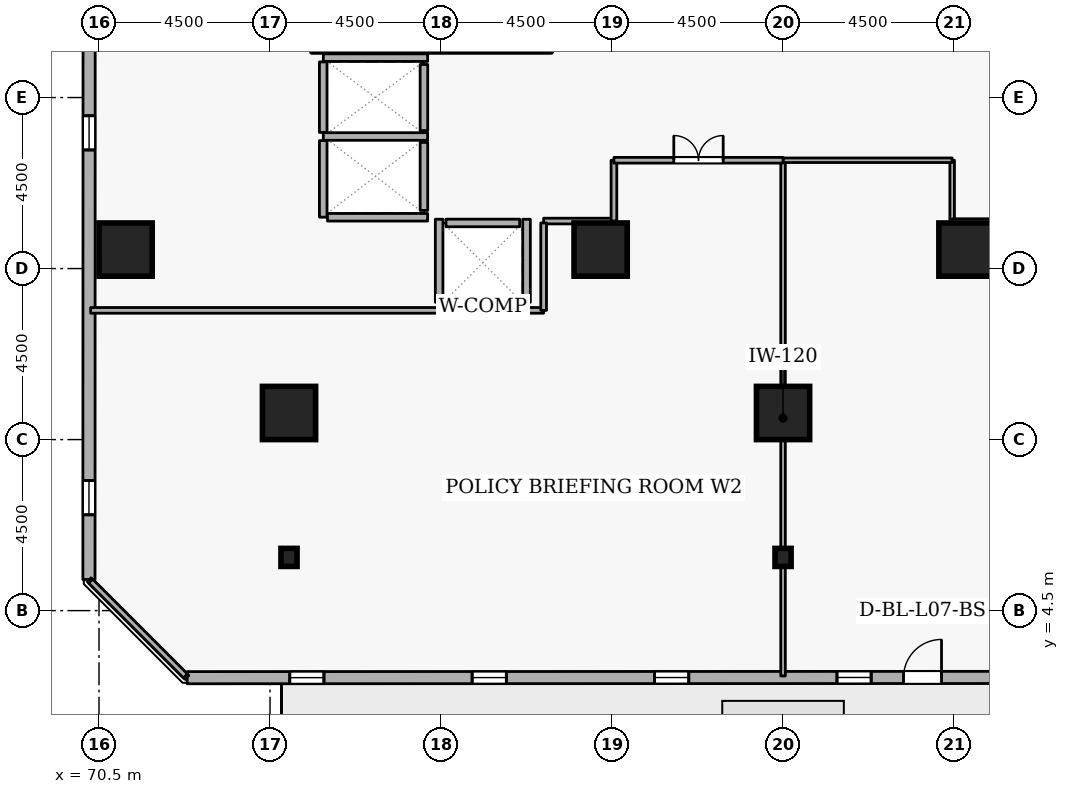
"""IFC4 building model, lengths in metres.
Left out: names, types, materials, properties, quantities, classifications, styles, units other than length and angle.
Written with IfcOpenShell. Run it as: python <this file> out.ifc"""

import sys

from ifc_helpers import new_model, si_unit, direction, frame, frame_2d, origin, origin_2d, place, context, subcontext, project, spatial, rectangle, i_section, extrude, element, fill, save


model = new_model("IFC4")
c1 = context("Model", 3, precision=1e-05, world=origin(), true_north=direction((0.0, 1.0)))
c2 = subcontext(c1, "Body", "Model", "MODEL_VIEW")
j1 = project(units=[si_unit("LENGTHUNIT", "METRE"), si_unit("PLANEANGLEUNIT", "RADIAN")], contexts=[c1])
p1 = place(None, origin())
s1 = spatial("IfcSite", under=j1, at=p1, CompositionType="ELEMENT")
p2 = place(p1, origin())
s2 = spatial("IfcBuilding", under=s1, at=p2, CompositionType="ELEMENT")
p3 = place(p2, frame((0.0, 0.0, 31.5)))
s3 = spatial("IfcBuildingStorey", under=s2, at=p3, CompositionType="ELEMENT", Elevation=31.5)
for number, where, z_axis, x_axis in (
    (1, (71.2, 14.0, 0.0), (0.0, 0.0, 1.0), (1.0, 0.0, 0.0)),
    (2, (88.5, 9.7, 0.0), (0.0, 0.0, 1.0), (1.0, 0.0, 0.0)),
    (3, (75.5, 9.7, 0.0), (0.0, 0.0, 1.0), (1.0, 0.0, 0.0)),
    (4, (93.3, 14.0, 0.0), (0.0, 0.0, 1.0), (1.0, 0.0, 0.0)),
    (5, (83.7, 14.0, 0.0), (0.0, 0.0, 1.0), (1.0, 0.0, 0.0)),
):
    element("IfcColumn", number, at=place(p3, frame(where, z_axis=z_axis, x_axis=x_axis)), inside=s3, PredefinedType="COLUMN", context=c2, shape_type="SweptSolid", body=[
        extrude(rectangle(XDim=1.4, YDim=1.4, at=origin_2d()), origin(), (0.0, 0.0, 1.0), 3.6),
    ])
for number, where, z_axis, x_axis in (
    (6, (88.5, 5.9, 0.0), (0.0, 0.0, 1.0), (1.0, 0.0, 0.0)),
    (7, (75.5, 5.9, 0.0), (0.0, 0.0, 1.0), (1.0, 0.0, 0.0)),
):
    element("IfcColumn", number, at=place(p3, frame(where, z_axis=z_axis, x_axis=x_axis)), inside=s3, PredefinedType="COLUMN", context=c2, shape_type="SweptSolid", body=[
        extrude(i_section(OverallWidth=0.424, OverallDepth=0.475, WebThickness=0.048, FlangeThickness=0.077, FilletRadius=0.015, at=origin_2d()), origin(), (0.0, 0.0, 1.0), 3.6),
    ])
p4 = place(p3, frame((72.819, 2.735, 0.0), z_axis=(0.0, 0.0, 1.0), x_axis=(0.999999952618, 0.000307837676, 0.0)))
e8 = element("IfcWall", 8, at=p4, inside=s3, PredefinedType="STANDARD", context=c2, shape_type="SweptSolid", body=[
    extrude(rectangle(XDim=34.103, YDim=0.32, at=frame_2d((17.051, 0.0))), origin(), (0.0, 0.0, 1.0), 2.7),
])
p5 = place(p4, frame((18.851, 0.0, 0.0)))
e9 = element("IfcOpeningElement", 9, at=p5, cuts=e8, PredefinedType="OPENING", context=c2, shape_type="SweptSolid", body=[
    extrude(rectangle(XDim=1.0, YDim=2.08, at=frame_2d((0.5, 1.04))), frame((0.0, 0.17, 0.0), z_axis=(0.0, -1.0, 0.0), x_axis=(1.0, 0.0, 0.0)), (0.0, 0.0, 1.0), 0.34),
])
p6 = place(p4, frame((2.7, 0.0, 0.72)))
e10 = element("IfcOpeningElement", 10, at=p6, cuts=e8, PredefinedType="OPENING", context=c2, shape_type="SweptSolid", body=[
    extrude(rectangle(XDim=0.9, YDim=1.75, at=frame_2d((0.45, 0.875))), frame((0.0, 0.17, 0.0), z_axis=(0.0, -1.0, 0.0), x_axis=(1.0, 0.0, 0.0)), (0.0, 0.0, 1.0), 0.34),
])
p7 = place(p4, frame((7.5, 0.0, 0.72)))
e11 = element("IfcOpeningElement", 11, at=p7, cuts=e8, PredefinedType="OPENING", context=c2, shape_type="SweptSolid", body=[
    extrude(rectangle(XDim=0.9, YDim=1.75, at=frame_2d((0.45, 0.875))), frame((0.0, 0.17, 0.0), z_axis=(0.0, -1.0, 0.0), x_axis=(1.0, 0.0, 0.0)), (0.0, 0.0, 1.0), 0.34),
])
p8 = place(p4, frame((12.3, 0.0, 0.72)))
e12 = element("IfcOpeningElement", 12, at=p8, cuts=e8, PredefinedType="OPENING", context=c2, shape_type="SweptSolid", body=[
    extrude(rectangle(XDim=0.9, YDim=1.75, at=frame_2d((0.45, 0.875))), frame((0.0, 0.17, 0.0), z_axis=(0.0, -1.0, 0.0), x_axis=(1.0, 0.0, 0.0)), (0.0, 0.0, 1.0), 0.34),
])
p9 = place(p4, frame((17.1, 0.0, 0.72)))
e13 = element("IfcOpeningElement", 13, at=p9, cuts=e8, PredefinedType="OPENING", context=c2, shape_type="SweptSolid", body=[
    extrude(rectangle(XDim=0.9, YDim=1.75, at=frame_2d((0.45, 0.875))), frame((0.0, 0.17, 0.0), z_axis=(0.0, -1.0, 0.0), x_axis=(1.0, 0.0, 0.0)), (0.0, 0.0, 1.0), 0.34),
])
p10 = place(p4, frame((21.9, 0.0, 0.72)))
e14 = element("IfcOpeningElement", 14, at=p10, cuts=e8, PredefinedType="OPENING", context=c2, shape_type="SweptSolid", body=[
    extrude(rectangle(XDim=0.9, YDim=1.75, at=frame_2d((0.45, 0.875))), frame((0.0, 0.17, 0.0), z_axis=(0.0, -1.0, 0.0), x_axis=(1.0, 0.0, 0.0)), (0.0, 0.0, 1.0), 0.34),
])
p11 = place(p4, frame((26.7, 0.0, 0.72)))
e15 = element("IfcOpeningElement", 15, at=p11, cuts=e8, PredefinedType="OPENING", context=c2, shape_type="SweptSolid", body=[
    extrude(rectangle(XDim=0.9, YDim=1.75, at=frame_2d((0.45, 0.875))), frame((0.0, 0.17, 0.0), z_axis=(0.0, -1.0, 0.0), x_axis=(1.0, 0.0, 0.0)), (0.0, 0.0, 1.0), 0.34),
])
p12 = place(p3, frame((70.246, 39.421, 0.0), z_axis=(0.0, 0.0, 1.0), x_axis=(-0.000307837676, -0.999999952618, 0.0)))
e16 = element("IfcWall", 16, at=p12, inside=s3, PredefinedType="STANDARD", context=c2, shape_type="SweptSolid", body=[
    extrude(rectangle(XDim=34.103, YDim=0.32, at=frame_2d((17.051, 0.0))), origin(), (0.0, 0.0, 1.0), 2.7),
])
p13 = place(p12, frame((2.7, 0.0, 0.72)))
e17 = element("IfcOpeningElement", 17, at=p13, cuts=e16, PredefinedType="OPENING", context=c2, shape_type="SweptSolid", body=[
    extrude(rectangle(XDim=0.9, YDim=1.75, at=frame_2d((0.45, 0.875))), frame((0.0, 0.17, 0.0), z_axis=(0.0, -1.0, 0.0), x_axis=(1.0, 0.0, 0.0)), (0.0, 0.0, 1.0), 0.34),
])
p14 = place(p12, frame((7.5, 0.0, 0.72)))
e18 = element("IfcOpeningElement", 18, at=p14, cuts=e16, PredefinedType="OPENING", context=c2, shape_type="SweptSolid", body=[
    extrude(rectangle(XDim=0.9, YDim=1.75, at=frame_2d((0.45, 0.875))), frame((0.0, 0.17, 0.0), z_axis=(0.0, -1.0, 0.0), x_axis=(1.0, 0.0, 0.0)), (0.0, 0.0, 1.0), 0.34),
])
p15 = place(p12, frame((17.1, 0.0, 0.72)))
e19 = element("IfcOpeningElement", 19, at=p15, cuts=e16, PredefinedType="OPENING", context=c2, shape_type="SweptSolid", body=[
    extrude(rectangle(XDim=0.9, YDim=1.75, at=frame_2d((0.45, 0.875))), frame((0.0, 0.17, 0.0), z_axis=(0.0, -1.0, 0.0), x_axis=(1.0, 0.0, 0.0)), (0.0, 0.0, 1.0), 0.34),
])
p16 = place(p12, frame((21.9, 0.0, 0.72)))
e20 = element("IfcOpeningElement", 20, at=p16, cuts=e16, PredefinedType="OPENING", context=c2, shape_type="SweptSolid", body=[
    extrude(rectangle(XDim=0.9, YDim=1.75, at=frame_2d((0.45, 0.875))), frame((0.0, 0.17, 0.0), z_axis=(0.0, -1.0, 0.0), x_axis=(1.0, 0.0, 0.0)), (0.0, 0.0, 1.0), 0.34),
])
p17 = place(p12, frame((31.5, 0.0, 0.72)))
e21 = element("IfcOpeningElement", 21, at=p17, cuts=e16, PredefinedType="OPENING", context=c2, shape_type="SweptSolid", body=[
    extrude(rectangle(XDim=0.9, YDim=1.75, at=frame_2d((0.45, 0.875))), frame((0.0, 0.17, 0.0), z_axis=(0.0, -1.0, 0.0), x_axis=(1.0, 0.0, 0.0)), (0.0, 0.0, 1.0), 0.34),
])
p18 = place(p3, frame((79.05, 17.13, 0.0), z_axis=(0.0, 0.0, 1.0), x_axis=(0.0, 1.0, 0.0)))
e22 = element("IfcWall", 22, at=p18, inside=s3, PredefinedType="STANDARD", context=c2, shape_type="SweptSolid", body=[
    extrude(rectangle(XDim=1.74, YDim=0.2, at=frame_2d((0.87, 0.0))), origin(), (0.0, 0.0, 1.0), 3.34),
])
p19 = place(p3, frame((79.05, 15.03, 0.0), z_axis=(0.0, 0.0, 1.0), x_axis=(0.0, 1.0, 0.0)))
e23 = element("IfcWall", 23, at=p19, inside=s3, PredefinedType="STANDARD", context=c2, shape_type="SweptSolid", body=[
    extrude(rectangle(XDim=1.79, YDim=0.2, at=frame_2d((0.895, 0.0))), origin(), (0.0, 0.0, 1.0), 3.34),
])
p20 = place(p3, frame((79.63, 14.7, 0.0), z_axis=(0.0, 0.0, 1.0), x_axis=(1.0, 0.0, 0.0)))
e24 = element("IfcWall", 24, at=p20, inside=s3, PredefinedType="STANDARD", context=c2, shape_type="SweptSolid", body=[
    extrude(rectangle(XDim=1.94, YDim=0.2, at=frame_2d((0.97, 0.0))), origin(), (0.0, 0.0, 1.0), 3.34),
])
p21 = place(p3, frame((76.402, 19.05, 0.0), z_axis=(0.0, 0.0, 1.0), x_axis=(1.0, 0.0, 0.0)))
e25 = element("IfcWall", 25, at=p21, inside=s3, PredefinedType="STANDARD", context=c2, shape_type="SweptSolid", body=[
    extrude(rectangle(XDim=2.746, YDim=0.2, at=frame_2d((1.373, 0.0))), origin(), (0.0, 0.0, 1.0), 2.545),
])
p22 = place(p3, frame((76.402, 16.975, 0.0), z_axis=(0.0, 0.0, 1.0), x_axis=(1.0, 0.0, 0.0)))
e26 = element("IfcWall", 26, at=p22, inside=s3, PredefinedType="STANDARD", context=c2, shape_type="SweptSolid", body=[
    extrude(rectangle(XDim=2.746, YDim=0.2, at=frame_2d((1.373, 0.0))), origin(), (0.0, 0.0, 1.0), 3.34),
])
p23 = place(p3, frame((76.4, 14.852, 0.0), z_axis=(0.0, 0.0, 1.0), x_axis=(0.0, 1.0, 0.0)))
e27 = element("IfcWall", 27, at=p23, inside=s3, PredefinedType="STANDARD", context=c2, shape_type="SweptSolid", body=[
    extrude(rectangle(XDim=2.016, YDim=0.2, at=frame_2d((1.008, 0.0))), origin(), (0.0, 0.0, 1.0), 3.34),
])
p24 = place(p3, frame((76.4, 17.082, 0.0), z_axis=(0.0, 0.0, 1.0), x_axis=(0.0, 1.0, 0.0)))
e28 = element("IfcWall", 28, at=p24, inside=s3, PredefinedType="STANDARD", context=c2, shape_type="SweptSolid", body=[
    extrude(rectangle(XDim=1.856, YDim=0.2, at=frame_2d((0.928, 0.0))), origin(), (0.0, 0.0, 1.0), 3.34),
])
p25 = place(p3, frame((76.512, 14.85, 0.0), z_axis=(0.0, 0.0, 1.0), x_axis=(1.0, 0.0, 0.0)))
e29 = element("IfcWall", 29, at=p25, inside=s3, PredefinedType="STANDARD", context=c2, shape_type="SweptSolid", body=[
    extrude(rectangle(XDim=2.636, YDim=0.2, at=frame_2d((1.318, 0.0))), origin(), (0.0, 0.0, 1.0), 3.34),
])
p26 = place(p3, frame((79.452, 12.5, 0.0), z_axis=(0.0, 0.0, 1.0), x_axis=(1.0, 0.0, 0.0)))
e30 = element("IfcWall", 30, at=p26, inside=s3, PredefinedType="STANDARD", context=c2, shape_type="SweptSolid", body=[
    extrude(rectangle(XDim=2.296, YDim=0.2, at=frame_2d((1.148, 0.0))), origin(), (0.0, 0.0, 1.0), 3.34),
])
for number, where, z_axis, x_axis in (
    (31, (81.75, 12.612, 0.0), (0.0, 0.0, 1.0), (0.0, 1.0, 0.0)),
    (32, (79.45, 12.612, 0.0), (0.0, 0.0, 1.0), (0.0, 1.0, 0.0)),
):
    element("IfcWall", number, at=place(p3, frame(where, z_axis=z_axis, x_axis=x_axis)), inside=s3, PredefinedType="STANDARD", context=c2, shape_type="SweptSolid", body=[
        extrude(rectangle(XDim=2.186, YDim=0.2, at=frame_2d((1.093, 0.0))), origin(), (0.0, 0.0, 1.0), 3.34),
    ])
p27 = place(p3, frame((92.95, 16.35, 0.0), z_axis=(0.0, 0.0, 1.0), x_axis=(0.0, -1.0, 0.0)))
e33 = element("IfcWall", 33, at=p27, inside=s3, PredefinedType="PARTITIONING", context=c2, shape_type="SweptSolid", body=[
    extrude(rectangle(XDim=1.6, YDim=0.12, at=frame_2d((0.8, 0.0))), origin(), (0.0, 0.0, 1.0), 3.34),
])
p28 = place(p3, frame((92.95, 14.75, 0.0), z_axis=(0.0, 0.0, 1.0), x_axis=(1.0, 0.0, 0.0)))
e34 = element("IfcWall", 34, at=p28, inside=s3, PredefinedType="PARTITIONING", context=c2, shape_type="SweptSolid", body=[
    extrude(rectangle(XDim=1.85, YDim=0.12, at=frame_2d((0.925, 0.0))), origin(), (0.0, 0.0, 1.0), 3.34),
])
p29 = place(p3, frame((88.5, 2.78, 0.0), z_axis=(0.0, 0.0, 1.0), x_axis=(0.0, 1.0, 0.0)))
e35 = element("IfcWall", 35, at=p29, inside=s3, PredefinedType="PARTITIONING", context=c2, shape_type="SweptSolid", body=[
    extrude(rectangle(XDim=13.57, YDim=0.12, at=frame_2d((6.785, 0.0))), origin(), (0.0, 0.0, 1.0), 2.878),
])
p30 = place(p3, frame((88.5, 16.35, 0.0), z_axis=(0.0, 0.0, 1.0), x_axis=(1.0, 0.0, 0.0)))
e36 = element("IfcWall", 36, at=p30, inside=s3, PredefinedType="PARTITIONING", context=c2, shape_type="SweptSolid", body=[
    extrude(rectangle(XDim=4.45, YDim=0.12, at=frame_2d((2.225, 0.0))), origin(), (0.0, 0.0, 1.0), 3.34),
])
p31 = place(p3, frame((82.2, 14.75, 0.0), z_axis=(0.0, 0.0, 1.0), x_axis=(1.0, 0.0, 0.0)))
e37 = element("IfcWall", 37, at=p31, inside=s3, PredefinedType="PARTITIONING", context=c2, shape_type="SweptSolid", body=[
    extrude(rectangle(XDim=1.85, YDim=0.15, at=frame_2d((0.925, 0.0))), origin(), (0.0, 0.0, 1.0), 3.34),
])
p32 = place(p3, frame((84.05, 14.75, 0.0), z_axis=(0.0, 0.0, 1.0), x_axis=(0.0, 1.0, 0.0)))
e38 = element("IfcWall", 38, at=p32, inside=s3, PredefinedType="PARTITIONING", context=c2, shape_type="SweptSolid", body=[
    extrude(rectangle(XDim=1.6, YDim=0.15, at=frame_2d((0.8, 0.0))), origin(), (0.0, 0.0, 1.0), 3.34),
])
p33 = place(p3, frame((84.05, 16.35, 0.0), z_axis=(0.0, 0.0, 1.0), x_axis=(1.0, 0.0, 0.0)))
e39 = element("IfcWall", 39, at=p33, inside=s3, PredefinedType="PARTITIONING", context=c2, shape_type="SweptSolid", body=[
    extrude(rectangle(XDim=4.45, YDim=0.15, at=frame_2d((2.225, 0.0))), origin(), (0.0, 0.0, 1.0), 3.34),
])
p34 = place(p33, frame((1.575, 0.0, 0.0)))
e40 = element("IfcOpeningElement", 40, at=p34, cuts=e39, PredefinedType="OPENING", context=c2, shape_type="SweptSolid", body=[
    extrude(rectangle(XDim=1.3, YDim=2.12, at=frame_2d((0.65, 1.06))), frame((0.0, 0.085, 0.0), z_axis=(0.0, -1.0, 0.0), x_axis=(1.0, 0.0, 0.0)), (0.0, 0.0, 1.0), 0.17),
])
p35 = place(p3, frame((72.775, 2.78, 0.0), z_axis=(0.0, 0.0, 1.0), x_axis=(-0.707106781187, 0.707106781187, 0.0)))
e41 = element("IfcWall", 41, at=p35, inside=s3, PredefinedType="PARTITIONING", context=c2, shape_type="SweptSolid", body=[
    extrude(rectangle(XDim=3.528, YDim=0.15, at=frame_2d((1.764, 0.0))), origin(), (0.0, 0.0, 1.0), 3.34),
])
p36 = place(p3, frame((70.28, 12.4, 0.0), z_axis=(0.0, 0.0, 1.0), x_axis=(1.0, 0.0, 0.0)))
e42 = element("IfcWall", 42, at=p36, inside=s3, PredefinedType="PARTITIONING", context=c2, shape_type="SweptSolid", body=[
    extrude(rectangle(XDim=9.172, YDim=0.15, at=frame_2d((4.586, 0.0))), origin(), (0.0, 0.0, 1.0), 3.34),
])
p37 = place(p3, frame((81.748, 12.4, 0.0), z_axis=(0.0, 0.0, 1.0), x_axis=(1.0, 0.0, 0.0)))
e43 = element("IfcWall", 43, at=p37, inside=s3, PredefinedType="PARTITIONING", context=c2, shape_type="SweptSolid", body=[
    extrude(rectangle(XDim=0.452, YDim=0.15, at=frame_2d((0.226, 0.0))), origin(), (0.0, 0.0, 1.0), 3.34),
])
p38 = place(p3, frame((82.2, 12.4, 0.0), z_axis=(0.0, 0.0, 1.0), x_axis=(0.0, 1.0, 0.0)))
e44 = element("IfcWall", 44, at=p38, inside=s3, PredefinedType="PARTITIONING", context=c2, shape_type="SweptSolid", body=[
    extrude(rectangle(XDim=2.3, YDim=0.15, at=frame_2d((1.15, 0.0))), origin(), (0.0, 0.0, 1.0), 3.34),
])
p39 = place(p5, origin())
e45 = element("IfcDoor", 45, at=p39, inside=s3, OperationType="SINGLE_SWING_RIGHT", PredefinedType="DOOR", context=c2, shape_type="SweptSolid", body=[
    extrude(rectangle(XDim=1.0, YDim=2.08, at=frame_2d((0.5, 1.04))), frame((0.0, 0.025, 0.0), z_axis=(0.0, -1.0, 0.0), x_axis=(1.0, 0.0, 0.0)), (0.0, 0.0, 1.0), 0.05),
])
fill(e9, e45)
p40 = place(p6, origin())
e46 = element("IfcWindow", 46, at=p40, inside=s3, PartitioningType="SINGLE_PANEL", PredefinedType="WINDOW", context=c2, shape_type="SweptSolid", body=[
    extrude(rectangle(XDim=0.9, YDim=1.75, at=frame_2d((0.45, 0.875))), frame((0.0, 0.03, 0.0), z_axis=(0.0, -1.0, 0.0), x_axis=(1.0, 0.0, 0.0)), (0.0, 0.0, 1.0), 0.06),
])
fill(e10, e46)
p41 = place(p7, origin())
e47 = element("IfcWindow", 47, at=p41, inside=s3, PartitioningType="SINGLE_PANEL", PredefinedType="WINDOW", context=c2, shape_type="SweptSolid", body=[
    extrude(rectangle(XDim=0.9, YDim=1.75, at=frame_2d((0.45, 0.875))), frame((0.0, 0.03, 0.0), z_axis=(0.0, -1.0, 0.0), x_axis=(1.0, 0.0, 0.0)), (0.0, 0.0, 1.0), 0.06),
])
fill(e11, e47)
p42 = place(p8, origin())
e48 = element("IfcWindow", 48, at=p42, inside=s3, PartitioningType="SINGLE_PANEL", PredefinedType="WINDOW", context=c2, shape_type="SweptSolid", body=[
    extrude(rectangle(XDim=0.9, YDim=1.75, at=frame_2d((0.45, 0.875))), frame((0.0, 0.03, 0.0), z_axis=(0.0, -1.0, 0.0), x_axis=(1.0, 0.0, 0.0)), (0.0, 0.0, 1.0), 0.06),
])
fill(e12, e48)
p43 = place(p9, origin())
e49 = element("IfcWindow", 49, at=p43, inside=s3, PartitioningType="SINGLE_PANEL", PredefinedType="WINDOW", context=c2, shape_type="SweptSolid", body=[
    extrude(rectangle(XDim=0.9, YDim=1.75, at=frame_2d((0.45, 0.875))), frame((0.0, 0.03, 0.0), z_axis=(0.0, -1.0, 0.0), x_axis=(1.0, 0.0, 0.0)), (0.0, 0.0, 1.0), 0.06),
])
fill(e13, e49)
p44 = place(p16, origin())
e50 = element("IfcWindow", 50, at=p44, inside=s3, PartitioningType="SINGLE_PANEL", PredefinedType="WINDOW", context=c2, shape_type="SweptSolid", body=[
    extrude(rectangle(XDim=0.9, YDim=1.75, at=frame_2d((0.45, 0.875))), frame((0.0, 0.03, 0.0), z_axis=(0.0, -1.0, 0.0), x_axis=(1.0, 0.0, 0.0)), (0.0, 0.0, 1.0), 0.06),
])
fill(e20, e50)
p45 = place(p17, origin())
e51 = element("IfcWindow", 51, at=p45, inside=s3, PartitioningType="SINGLE_PANEL", PredefinedType="WINDOW", context=c2, shape_type="SweptSolid", body=[
    extrude(rectangle(XDim=0.9, YDim=1.75, at=frame_2d((0.45, 0.875))), frame((0.0, 0.03, 0.0), z_axis=(0.0, -1.0, 0.0), x_axis=(1.0, 0.0, 0.0)), (0.0, 0.0, 1.0), 0.06),
])
fill(e21, e51)
p46 = place(p34, origin())
e52 = element("IfcDoor", 52, at=p46, inside=s3, OperationType="DOUBLE_DOOR_SINGLE_SWING", PredefinedType="DOOR", context=c2, shape_type="SweptSolid", body=[
    extrude(rectangle(XDim=1.3, YDim=2.12, at=frame_2d((0.65, 1.06))), frame((0.0, 0.025, 0.0), z_axis=(0.0, -1.0, 0.0), x_axis=(1.0, 0.0, 0.0)), (0.0, 0.0, 1.0), 0.05),
])
fill(e40, e52)
save(model, sys.argv[1])
